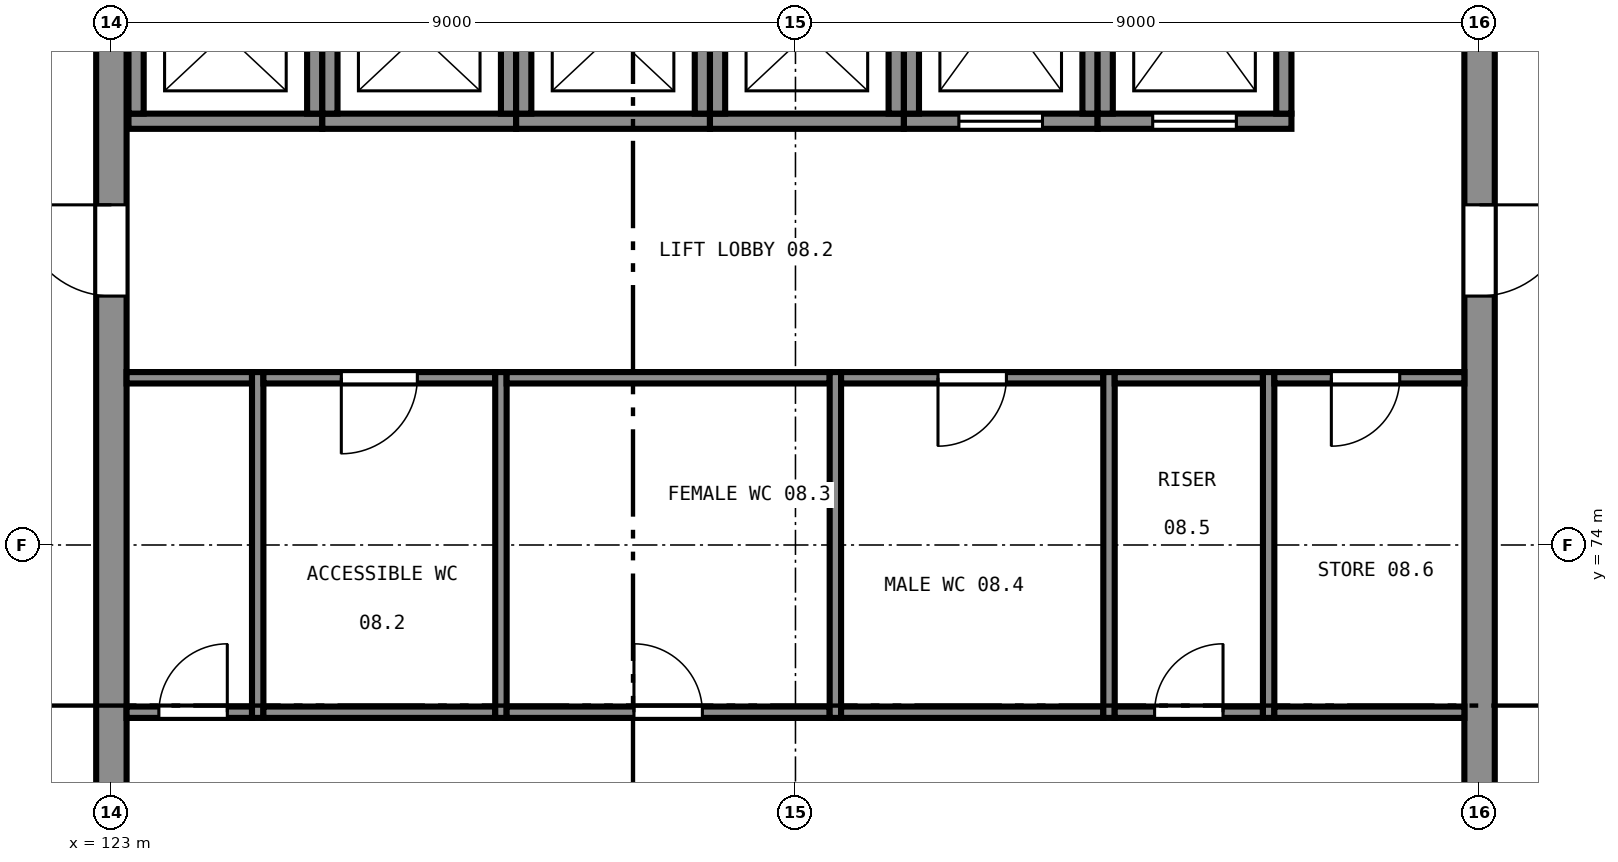
"""IFC4 building model, lengths in metres.
Left out: names, types, materials, properties, quantities, classifications, styles, units other than length and angle.
Written with IfcOpenShell. Run it as: python <this file> out.ifc"""

import sys

from ifc_helpers import new_model, si_unit, direction, frame, frame_2d, origin, place, context, subcontext, project, spatial, rectangle, extrude, element, fill, save


model = new_model("IFC4")
c1 = context("Model", 3, precision=1e-05, world=origin(), true_north=direction((0.0, 1.0)))
c2 = subcontext(c1, "Body", "Model", "MODEL_VIEW")
j1 = project(units=[si_unit("LENGTHUNIT", "METRE"), si_unit("PLANEANGLEUNIT", "RADIAN")], contexts=[c1])
p1 = place(None, origin())
s1 = spatial("IfcSite", under=j1, at=p1, CompositionType="ELEMENT")
p2 = place(p1, origin())
s2 = spatial("IfcBuilding", under=s1, at=p2, CompositionType="ELEMENT")
p3 = place(p2, frame((0.0, 0.0, 33.5)))
s3 = spatial("IfcBuildingStorey", under=s2, at=p3, CompositionType="ELEMENT", Elevation=33.5)
p4 = place(p3, frame((141.0, 65.2, 0.0), z_axis=(0.0, 0.0, 1.0), x_axis=(0.0, 1.0, 0.0)))
e1 = element("IfcWall", 1, at=p4, inside=s3, PredefinedType="SHEAR", context=c2, shape_type="SweptSolid", body=[
    extrude(rectangle(XDim=17.6, YDim=0.4, at=frame_2d((8.8, 0.0))), origin(), (0.0, 0.0, 1.0), 4.0),
])
p5 = place(p4, frame((4.325, 0.0, 0.0)))
e2 = element("IfcOpeningElement", 2, at=p5, cuts=e1, PredefinedType="OPENING", context=c2, shape_type="SweptSolid", body=[
    extrude(rectangle(XDim=1.2, YDim=2.1, at=frame_2d((0.6, 1.05))), frame((0.0, 0.21, 0.0), z_axis=(0.0, -1.0, 0.0), x_axis=(1.0, 0.0, 0.0)), (0.0, 0.0, 1.0), 0.42),
])
p6 = place(p4, frame((12.075, 0.0, 0.0)))
e3 = element("IfcOpeningElement", 3, at=p6, cuts=e1, PredefinedType="OPENING", context=c2, shape_type="SweptSolid", body=[
    extrude(rectangle(XDim=1.2, YDim=2.1, at=frame_2d((0.6, 1.05))), frame((0.0, 0.21, 0.0), z_axis=(0.0, -1.0, 0.0), x_axis=(1.0, 0.0, 0.0)), (0.0, 0.0, 1.0), 0.42),
])
p7 = place(p3, frame((123.0, 82.8, 0.0), z_axis=(0.0, 0.0, 1.0), x_axis=(0.0, -1.0, 0.0)))
e4 = element("IfcWall", 4, at=p7, inside=s3, PredefinedType="SHEAR", context=c2, shape_type="SweptSolid", body=[
    extrude(rectangle(XDim=17.6, YDim=0.4, at=frame_2d((8.8, 0.0))), origin(), (0.0, 0.0, 1.0), 4.0),
])
p8 = place(p7, frame((12.075, 0.0, 0.0)))
e5 = element("IfcOpeningElement", 5, at=p8, cuts=e4, PredefinedType="OPENING", context=c2, shape_type="SweptSolid", body=[
    extrude(rectangle(XDim=1.2, YDim=2.1, at=frame_2d((0.6, 1.05))), frame((0.0, 0.21, 0.0), z_axis=(0.0, -1.0, 0.0), x_axis=(1.0, 0.0, 0.0)), (0.0, 0.0, 1.0), 0.42),
])
p9 = place(p7, frame((4.325, 0.0, 0.0)))
e6 = element("IfcOpeningElement", 6, at=p9, cuts=e4, PredefinedType="OPENING", context=c2, shape_type="SweptSolid", body=[
    extrude(rectangle(XDim=1.2, YDim=2.1, at=frame_2d((0.6, 1.05))), frame((0.0, 0.21, 0.0), z_axis=(0.0, -1.0, 0.0), x_axis=(1.0, 0.0, 0.0)), (0.0, 0.0, 1.0), 0.42),
])
p10 = place(p3, frame((123.225, 79.575, 0.0), z_axis=(0.0, 0.0, 1.0), x_axis=(1.0, 0.0, 0.0)))
e7 = element("IfcWall", 7, at=p10, inside=s3, PredefinedType="SHEAR", context=c2, shape_type="SweptSolid", body=[
    extrude(rectangle(XDim=2.55, YDim=0.2, at=frame_2d((1.275, 0.0))), origin(), (0.0, 0.0, 1.0), 4.0),
])
for number, where, z_axis, x_axis in (
    (8, (125.675, 79.675, 0.0), (0.0, 0.0, 1.0), (0.0, 1.0, 0.0)),
    (9, (123.325, 81.775, 0.0), (0.0, 0.0, 1.0), (0.0, -1.0, 0.0)),
):
    element("IfcWall", number, at=place(p3, frame(where, z_axis=z_axis, x_axis=x_axis)), inside=s3, PredefinedType="SHEAR", context=c2, shape_type="SweptSolid", body=[
        extrude(rectangle(XDim=2.1, YDim=0.2, at=frame_2d((1.05, 0.0))), origin(), (0.0, 0.0, 1.0), 4.0),
    ])
p11 = place(p3, frame((125.775, 79.575, 0.0), z_axis=(0.0, 0.0, 1.0), x_axis=(1.0, 0.0, 0.0)))
e10 = element("IfcWall", 10, at=p11, inside=s3, PredefinedType="SHEAR", context=c2, shape_type="SweptSolid", body=[
    extrude(rectangle(XDim=2.55, YDim=0.2, at=frame_2d((1.275, 0.0))), origin(), (0.0, 0.0, 1.0), 4.0),
])
for number, where, z_axis, x_axis in (
    (11, (128.225, 79.675, 0.0), (0.0, 0.0, 1.0), (0.0, 1.0, 0.0)),
    (12, (125.875, 81.775, 0.0), (0.0, 0.0, 1.0), (0.0, -1.0, 0.0)),
):
    element("IfcWall", number, at=place(p3, frame(where, z_axis=z_axis, x_axis=x_axis)), inside=s3, PredefinedType="SHEAR", context=c2, shape_type="SweptSolid", body=[
        extrude(rectangle(XDim=2.1, YDim=0.2, at=frame_2d((1.05, 0.0))), origin(), (0.0, 0.0, 1.0), 4.0),
    ])
p12 = place(p3, frame((128.325, 79.575, 0.0), z_axis=(0.0, 0.0, 1.0), x_axis=(1.0, 0.0, 0.0)))
e13 = element("IfcWall", 13, at=p12, inside=s3, PredefinedType="SHEAR", context=c2, shape_type="SweptSolid", body=[
    extrude(rectangle(XDim=2.55, YDim=0.2, at=frame_2d((1.275, 0.0))), origin(), (0.0, 0.0, 1.0), 4.0),
])
for number, where, z_axis, x_axis in (
    (14, (130.775, 79.675, 0.0), (0.0, 0.0, 1.0), (0.0, 1.0, 0.0)),
    (15, (128.425, 81.775, 0.0), (0.0, 0.0, 1.0), (0.0, -1.0, 0.0)),
):
    element("IfcWall", number, at=place(p3, frame(where, z_axis=z_axis, x_axis=x_axis)), inside=s3, PredefinedType="SHEAR", context=c2, shape_type="SweptSolid", body=[
        extrude(rectangle(XDim=2.1, YDim=0.2, at=frame_2d((1.05, 0.0))), origin(), (0.0, 0.0, 1.0), 4.0),
    ])
p13 = place(p3, frame((130.875, 79.575, 0.0), z_axis=(0.0, 0.0, 1.0), x_axis=(1.0, 0.0, 0.0)))
e16 = element("IfcWall", 16, at=p13, inside=s3, PredefinedType="SHEAR", context=c2, shape_type="SweptSolid", body=[
    extrude(rectangle(XDim=2.55, YDim=0.2, at=frame_2d((1.275, 0.0))), origin(), (0.0, 0.0, 1.0), 4.0),
])
for number, where, z_axis, x_axis in (
    (17, (133.325, 79.675, 0.0), (0.0, 0.0, 1.0), (0.0, 1.0, 0.0)),
    (18, (130.975, 81.775, 0.0), (0.0, 0.0, 1.0), (0.0, -1.0, 0.0)),
):
    element("IfcWall", number, at=place(p3, frame(where, z_axis=z_axis, x_axis=x_axis)), inside=s3, PredefinedType="SHEAR", context=c2, shape_type="SweptSolid", body=[
        extrude(rectangle(XDim=2.1, YDim=0.2, at=frame_2d((1.05, 0.0))), origin(), (0.0, 0.0, 1.0), 4.0),
    ])
p14 = place(p3, frame((133.425, 79.575, 0.0), z_axis=(0.0, 0.0, 1.0), x_axis=(1.0, 0.0, 0.0)))
e19 = element("IfcWall", 19, at=p14, inside=s3, PredefinedType="SHEAR", context=c2, shape_type="SweptSolid", body=[
    extrude(rectangle(XDim=2.55, YDim=0.2, at=frame_2d((1.275, 0.0))), origin(), (0.0, 0.0, 1.0), 4.0),
])
p15 = place(p14, frame((0.725, 0.0, 0.0)))
e20 = element("IfcOpeningElement", 20, at=p15, cuts=e19, PredefinedType="OPENING", context=c2, shape_type="SweptSolid", body=[
    extrude(rectangle(XDim=1.1, YDim=2.1, at=frame_2d((0.55, 1.05))), frame((0.0, 0.11, 0.0), z_axis=(0.0, -1.0, 0.0), x_axis=(1.0, 0.0, 0.0)), (0.0, 0.0, 1.0), 0.22),
])
for number, where, z_axis, x_axis in (
    (21, (135.875, 79.675, 0.0), (0.0, 0.0, 1.0), (0.0, 1.0, 0.0)),
    (22, (133.525, 82.475, 0.0), (0.0, 0.0, 1.0), (0.0, -1.0, 0.0)),
):
    element("IfcWall", number, at=place(p3, frame(where, z_axis=z_axis, x_axis=x_axis)), inside=s3, PredefinedType="SHEAR", context=c2, shape_type="SweptSolid", body=[
        extrude(rectangle(XDim=2.8, YDim=0.2, at=frame_2d((1.4, 0.0))), origin(), (0.0, 0.0, 1.0), 4.0),
    ])
p16 = place(p3, frame((135.975, 79.575, 0.0), z_axis=(0.0, 0.0, 1.0), x_axis=(1.0, 0.0, 0.0)))
e23 = element("IfcWall", 23, at=p16, inside=s3, PredefinedType="SHEAR", context=c2, shape_type="SweptSolid", body=[
    extrude(rectangle(XDim=2.55, YDim=0.2, at=frame_2d((1.275, 0.0))), origin(), (0.0, 0.0, 1.0), 4.0),
])
p17 = place(p16, frame((0.725, 0.0, 0.0)))
e24 = element("IfcOpeningElement", 24, at=p17, cuts=e23, PredefinedType="OPENING", context=c2, shape_type="SweptSolid", body=[
    extrude(rectangle(XDim=1.1, YDim=2.1, at=frame_2d((0.55, 1.05))), frame((0.0, 0.11, 0.0), z_axis=(0.0, -1.0, 0.0), x_axis=(1.0, 0.0, 0.0)), (0.0, 0.0, 1.0), 0.22),
])
for number, where, z_axis, x_axis in (
    (25, (138.425, 79.675, 0.0), (0.0, 0.0, 1.0), (0.0, 1.0, 0.0)),
    (26, (136.075, 82.475, 0.0), (0.0, 0.0, 1.0), (0.0, -1.0, 0.0)),
):
    element("IfcWall", number, at=place(p3, frame(where, z_axis=z_axis, x_axis=x_axis)), inside=s3, PredefinedType="SHEAR", context=c2, shape_type="SweptSolid", body=[
        extrude(rectangle(XDim=2.8, YDim=0.2, at=frame_2d((1.4, 0.0))), origin(), (0.0, 0.0, 1.0), 4.0),
    ])
p18 = place(p3, frame((124.925, 71.725, 0.0), z_axis=(0.0, 0.0, 1.0), x_axis=(0.0, 1.0, 0.0)))
e27 = element("IfcWall", 27, at=p18, inside=s3, PredefinedType="PARTITIONING", context=c2, shape_type="SweptSolid", body=[
    extrude(rectangle(XDim=4.55, YDim=0.15, at=frame_2d((2.275, 0.0))), origin(), (0.0, 0.0, 1.0), 3.75),
])
p19 = place(p3, frame((123.2, 71.8, 0.0), z_axis=(0.0, 0.0, 1.0), x_axis=(1.0, 0.0, 0.0)))
e28 = element("IfcWall", 28, at=p19, inside=s3, PredefinedType="PARTITIONING", context=c2, shape_type="SweptSolid", body=[
    extrude(rectangle(XDim=1.65, YDim=0.15, at=frame_2d((0.825, 0.0))), origin(), (0.0, 0.0, 1.0), 3.75),
])
p20 = place(p19, frame((0.425, 0.0, 0.0)))
e29 = element("IfcOpeningElement", 29, at=p20, cuts=e28, PredefinedType="OPENING", context=c2, shape_type="SweptSolid", body=[
    extrude(rectangle(XDim=0.9, YDim=2.1, at=frame_2d((0.45, 1.05))), frame((0.0, 0.085, 0.0), z_axis=(0.0, -1.0, 0.0), x_axis=(1.0, 0.0, 0.0)), (0.0, 0.0, 1.0), 0.17),
])
p21 = place(p3, frame((123.2, 76.2, 0.0), z_axis=(0.0, 0.0, 1.0), x_axis=(1.0, 0.0, 0.0)))
e30 = element("IfcWall", 30, at=p21, inside=s3, PredefinedType="PARTITIONING", context=c2, shape_type="SweptSolid", body=[
    extrude(rectangle(XDim=1.65, YDim=0.15, at=frame_2d((0.825, 0.0))), origin(), (0.0, 0.0, 1.0), 3.75),
])
p22 = place(p3, frame((128.125, 71.725, 0.0), z_axis=(0.0, 0.0, 1.0), x_axis=(0.0, 1.0, 0.0)))
e31 = element("IfcWall", 31, at=p22, inside=s3, PredefinedType="PARTITIONING", context=c2, shape_type="SweptSolid", body=[
    extrude(rectangle(XDim=4.55, YDim=0.15, at=frame_2d((2.275, 0.0))), origin(), (0.0, 0.0, 1.0), 3.75),
])
p23 = place(p3, frame((125.0, 71.8, 0.0), z_axis=(0.0, 0.0, 1.0), x_axis=(1.0, 0.0, 0.0)))
e32 = element("IfcWall", 32, at=p23, inside=s3, PredefinedType="PARTITIONING", context=c2, shape_type="SweptSolid", body=[
    extrude(rectangle(XDim=3.05, YDim=0.15, at=frame_2d((1.525, 0.0))), origin(), (0.0, 0.0, 1.0), 3.75),
])
p24 = place(p3, frame((125.0, 76.2, 0.0), z_axis=(0.0, 0.0, 1.0), x_axis=(1.0, 0.0, 0.0)))
e33 = element("IfcWall", 33, at=p24, inside=s3, PredefinedType="PARTITIONING", context=c2, shape_type="SweptSolid", body=[
    extrude(rectangle(XDim=3.05, YDim=0.15, at=frame_2d((1.525, 0.0))), origin(), (0.0, 0.0, 1.0), 3.75),
])
p25 = place(p24, frame((1.025, 0.0, 0.0)))
e34 = element("IfcOpeningElement", 34, at=p25, cuts=e33, PredefinedType="OPENING", context=c2, shape_type="SweptSolid", body=[
    extrude(rectangle(XDim=1.0, YDim=2.1, at=frame_2d((0.5, 1.05))), frame((0.0, 0.085, 0.0), z_axis=(0.0, -1.0, 0.0), x_axis=(1.0, 0.0, 0.0)), (0.0, 0.0, 1.0), 0.17),
])
p26 = place(p3, frame((132.525, 71.725, 0.0), z_axis=(0.0, 0.0, 1.0), x_axis=(0.0, 1.0, 0.0)))
e35 = element("IfcWall", 35, at=p26, inside=s3, PredefinedType="PARTITIONING", context=c2, shape_type="SweptSolid", body=[
    extrude(rectangle(XDim=4.55, YDim=0.15, at=frame_2d((2.275, 0.0))), origin(), (0.0, 0.0, 1.0), 3.75),
])
p27 = place(p3, frame((128.2, 71.8, 0.0), z_axis=(0.0, 0.0, 1.0), x_axis=(1.0, 0.0, 0.0)))
e36 = element("IfcWall", 36, at=p27, inside=s3, PredefinedType="PARTITIONING", context=c2, shape_type="SweptSolid", body=[
    extrude(rectangle(XDim=4.25, YDim=0.15, at=frame_2d((2.125, 0.0))), origin(), (0.0, 0.0, 1.0), 3.75),
])
p28 = place(p27, frame((1.675, 0.0, 0.0)))
e37 = element("IfcOpeningElement", 37, at=p28, cuts=e36, PredefinedType="OPENING", context=c2, shape_type="SweptSolid", body=[
    extrude(rectangle(XDim=0.9, YDim=2.1, at=frame_2d((0.45, 1.05))), frame((0.0, 0.085, 0.0), z_axis=(0.0, -1.0, 0.0), x_axis=(1.0, 0.0, 0.0)), (0.0, 0.0, 1.0), 0.17),
])
p29 = place(p3, frame((128.2, 76.2, 0.0), z_axis=(0.0, 0.0, 1.0), x_axis=(1.0, 0.0, 0.0)))
e38 = element("IfcWall", 38, at=p29, inside=s3, PredefinedType="PARTITIONING", context=c2, shape_type="SweptSolid", body=[
    extrude(rectangle(XDim=4.25, YDim=0.15, at=frame_2d((2.125, 0.0))), origin(), (0.0, 0.0, 1.0), 3.75),
])
p30 = place(p3, frame((136.125, 71.725, 0.0), z_axis=(0.0, 0.0, 1.0), x_axis=(0.0, 1.0, 0.0)))
e39 = element("IfcWall", 39, at=p30, inside=s3, PredefinedType="PARTITIONING", context=c2, shape_type="SweptSolid", body=[
    extrude(rectangle(XDim=4.55, YDim=0.15, at=frame_2d((2.275, 0.0))), origin(), (0.0, 0.0, 1.0), 3.75),
])
p31 = place(p3, frame((132.6, 71.8, 0.0), z_axis=(0.0, 0.0, 1.0), x_axis=(1.0, 0.0, 0.0)))
e40 = element("IfcWall", 40, at=p31, inside=s3, PredefinedType="PARTITIONING", context=c2, shape_type="SweptSolid", body=[
    extrude(rectangle(XDim=3.45, YDim=0.15, at=frame_2d((1.725, 0.0))), origin(), (0.0, 0.0, 1.0), 3.75),
])
p32 = place(p3, frame((132.6, 76.2, 0.0), z_axis=(0.0, 0.0, 1.0), x_axis=(1.0, 0.0, 0.0)))
e41 = element("IfcWall", 41, at=p32, inside=s3, PredefinedType="PARTITIONING", context=c2, shape_type="SweptSolid", body=[
    extrude(rectangle(XDim=3.45, YDim=0.15, at=frame_2d((1.725, 0.0))), origin(), (0.0, 0.0, 1.0), 3.75),
])
p33 = place(p32, frame((1.275, 0.0, 0.0)))
e42 = element("IfcOpeningElement", 42, at=p33, cuts=e41, PredefinedType="OPENING", context=c2, shape_type="SweptSolid", body=[
    extrude(rectangle(XDim=0.9, YDim=2.1, at=frame_2d((0.45, 1.05))), frame((0.0, 0.085, 0.0), z_axis=(0.0, -1.0, 0.0), x_axis=(1.0, 0.0, 0.0)), (0.0, 0.0, 1.0), 0.17),
])
p34 = place(p3, frame((138.225, 71.725, 0.0), z_axis=(0.0, 0.0, 1.0), x_axis=(0.0, 1.0, 0.0)))
e43 = element("IfcWall", 43, at=p34, inside=s3, PredefinedType="PARTITIONING", context=c2, shape_type="SweptSolid", body=[
    extrude(rectangle(XDim=4.55, YDim=0.15, at=frame_2d((2.275, 0.0))), origin(), (0.0, 0.0, 1.0), 3.75),
])
p35 = place(p3, frame((136.2, 71.8, 0.0), z_axis=(0.0, 0.0, 1.0), x_axis=(1.0, 0.0, 0.0)))
e44 = element("IfcWall", 44, at=p35, inside=s3, PredefinedType="PARTITIONING", context=c2, shape_type="SweptSolid", body=[
    extrude(rectangle(XDim=1.95, YDim=0.15, at=frame_2d((0.975, 0.0))), origin(), (0.0, 0.0, 1.0), 3.75),
])
p36 = place(p35, frame((0.525, 0.0, 0.0)))
e45 = element("IfcOpeningElement", 45, at=p36, cuts=e44, PredefinedType="OPENING", context=c2, shape_type="SweptSolid", body=[
    extrude(rectangle(XDim=0.9, YDim=2.1, at=frame_2d((0.45, 1.05))), frame((0.0, 0.085, 0.0), z_axis=(0.0, -1.0, 0.0), x_axis=(1.0, 0.0, 0.0)), (0.0, 0.0, 1.0), 0.17),
])
p37 = place(p3, frame((136.2, 76.2, 0.0), z_axis=(0.0, 0.0, 1.0), x_axis=(1.0, 0.0, 0.0)))
e46 = element("IfcWall", 46, at=p37, inside=s3, PredefinedType="PARTITIONING", context=c2, shape_type="SweptSolid", body=[
    extrude(rectangle(XDim=1.95, YDim=0.15, at=frame_2d((0.975, 0.0))), origin(), (0.0, 0.0, 1.0), 3.75),
])
p38 = place(p3, frame((138.3, 71.8, 0.0), z_axis=(0.0, 0.0, 1.0), x_axis=(1.0, 0.0, 0.0)))
e47 = element("IfcWall", 47, at=p38, inside=s3, PredefinedType="PARTITIONING", context=c2, shape_type="SweptSolid", body=[
    extrude(rectangle(XDim=2.5, YDim=0.15, at=frame_2d((1.25, 0.0))), origin(), (0.0, 0.0, 1.0), 3.75),
])
p39 = place(p3, frame((138.3, 76.2, 0.0), z_axis=(0.0, 0.0, 1.0), x_axis=(1.0, 0.0, 0.0)))
e48 = element("IfcWall", 48, at=p39, inside=s3, PredefinedType="PARTITIONING", context=c2, shape_type="SweptSolid", body=[
    extrude(rectangle(XDim=2.5, YDim=0.15, at=frame_2d((1.25, 0.0))), origin(), (0.0, 0.0, 1.0), 3.75),
])
p40 = place(p39, frame((0.75, 0.0, 0.0)))
e49 = element("IfcOpeningElement", 49, at=p40, cuts=e48, PredefinedType="OPENING", context=c2, shape_type="SweptSolid", body=[
    extrude(rectangle(XDim=0.9, YDim=2.1, at=frame_2d((0.45, 1.05))), frame((0.0, 0.085, 0.0), z_axis=(0.0, -1.0, 0.0), x_axis=(1.0, 0.0, 0.0)), (0.0, 0.0, 1.0), 0.17),
])
p41 = place(p15, origin())
e50 = element("IfcDoor", 50, at=p41, inside=s3, OperationType="SLIDING_TO_LEFT", PredefinedType="DOOR", context=c2, shape_type="SweptSolid", body=[
    extrude(rectangle(XDim=1.1, YDim=2.1, at=frame_2d((0.55, 1.05))), frame((0.0, 0.025, 0.0), z_axis=(0.0, -1.0, 0.0), x_axis=(1.0, 0.0, 0.0)), (0.0, 0.0, 1.0), 0.05),
])
fill(e20, e50)
p42 = place(p17, origin())
e51 = element("IfcDoor", 51, at=p42, inside=s3, OperationType="SLIDING_TO_LEFT", PredefinedType="DOOR", context=c2, shape_type="SweptSolid", body=[
    extrude(rectangle(XDim=1.1, YDim=2.1, at=frame_2d((0.55, 1.05))), frame((0.0, 0.025, 0.0), z_axis=(0.0, -1.0, 0.0), x_axis=(1.0, 0.0, 0.0)), (0.0, 0.0, 1.0), 0.05),
])
fill(e24, e51)
p43 = place(p9, frame((1.2, 0.0, 0.0), z_axis=(0.0, 0.0, 1.0), x_axis=(-1.0, 0.0, 0.0)))
e52 = element("IfcDoor", 52, at=p43, inside=s3, OperationType="SINGLE_SWING_LEFT", PredefinedType="DOOR", context=c2, shape_type="SweptSolid", body=[
    extrude(rectangle(XDim=1.2, YDim=2.1, at=frame_2d((0.6, 1.05))), frame((0.0, 0.025, 0.0), z_axis=(0.0, -1.0, 0.0), x_axis=(1.0, 0.0, 0.0)), (0.0, 0.0, 1.0), 0.05),
])
fill(e6, e52)
p44 = place(p6, frame((1.2, 0.0, 0.0), z_axis=(0.0, 0.0, 1.0), x_axis=(-1.0, 0.0, 0.0)))
e53 = element("IfcDoor", 53, at=p44, inside=s3, OperationType="SINGLE_SWING_RIGHT", PredefinedType="DOOR", context=c2, shape_type="SweptSolid", body=[
    extrude(rectangle(XDim=1.2, YDim=2.1, at=frame_2d((0.6, 1.05))), frame((0.0, 0.025, 0.0), z_axis=(0.0, -1.0, 0.0), x_axis=(1.0, 0.0, 0.0)), (0.0, 0.0, 1.0), 0.05),
])
fill(e3, e53)
p45 = place(p20, origin())
e54 = element("IfcDoor", 54, at=p45, inside=s3, OperationType="SINGLE_SWING_LEFT", PredefinedType="DOOR", context=c2, shape_type="SweptSolid", body=[
    extrude(rectangle(XDim=0.9, YDim=2.1, at=frame_2d((0.45, 1.05))), frame((0.0, 0.025, 0.0), z_axis=(0.0, -1.0, 0.0), x_axis=(1.0, 0.0, 0.0)), (0.0, 0.0, 1.0), 0.05),
])
fill(e29, e54)
p46 = place(p25, frame((1.0, 0.0, 0.0), z_axis=(0.0, 0.0, 1.0), x_axis=(-1.0, 0.0, 0.0)))
e55 = element("IfcDoor", 55, at=p46, inside=s3, OperationType="SINGLE_SWING_LEFT", PredefinedType="DOOR", context=c2, shape_type="SweptSolid", body=[
    extrude(rectangle(XDim=1.0, YDim=2.1, at=frame_2d((0.5, 1.05))), frame((0.0, 0.025, 0.0), z_axis=(0.0, -1.0, 0.0), x_axis=(1.0, 0.0, 0.0)), (0.0, 0.0, 1.0), 0.05),
])
fill(e34, e55)
p47 = place(p28, origin())
e56 = element("IfcDoor", 56, at=p47, inside=s3, OperationType="SINGLE_SWING_RIGHT", PredefinedType="DOOR", context=c2, shape_type="SweptSolid", body=[
    extrude(rectangle(XDim=0.9, YDim=2.1, at=frame_2d((0.45, 1.05))), frame((0.0, 0.025, 0.0), z_axis=(0.0, -1.0, 0.0), x_axis=(1.0, 0.0, 0.0)), (0.0, 0.0, 1.0), 0.05),
])
fill(e37, e56)
p48 = place(p33, frame((0.9, 0.0, 0.0), z_axis=(0.0, 0.0, 1.0), x_axis=(-1.0, 0.0, 0.0)))
e57 = element("IfcDoor", 57, at=p48, inside=s3, OperationType="SINGLE_SWING_LEFT", PredefinedType="DOOR", context=c2, shape_type="SweptSolid", body=[
    extrude(rectangle(XDim=0.9, YDim=2.1, at=frame_2d((0.45, 1.05))), frame((0.0, 0.025, 0.0), z_axis=(0.0, -1.0, 0.0), x_axis=(1.0, 0.0, 0.0)), (0.0, 0.0, 1.0), 0.05),
])
fill(e42, e57)
p49 = place(p36, origin())
e58 = element("IfcDoor", 58, at=p49, inside=s3, OperationType="SINGLE_SWING_LEFT", PredefinedType="DOOR", context=c2, shape_type="SweptSolid", body=[
    extrude(rectangle(XDim=0.9, YDim=2.1, at=frame_2d((0.45, 1.05))), frame((0.0, 0.025, 0.0), z_axis=(0.0, -1.0, 0.0), x_axis=(1.0, 0.0, 0.0)), (0.0, 0.0, 1.0), 0.05),
])
fill(e45, e58)
p50 = place(p40, frame((0.9, 0.0, 0.0), z_axis=(0.0, 0.0, 1.0), x_axis=(-1.0, 0.0, 0.0)))
e59 = element("IfcDoor", 59, at=p50, inside=s3, OperationType="SINGLE_SWING_LEFT", PredefinedType="DOOR", context=c2, shape_type="SweptSolid", body=[
    extrude(rectangle(XDim=0.9, YDim=2.1, at=frame_2d((0.45, 1.05))), frame((0.0, 0.025, 0.0), z_axis=(0.0, -1.0, 0.0), x_axis=(1.0, 0.0, 0.0)), (0.0, 0.0, 1.0), 0.05),
])
fill(e49, e59)
save(model, sys.argv[1])
